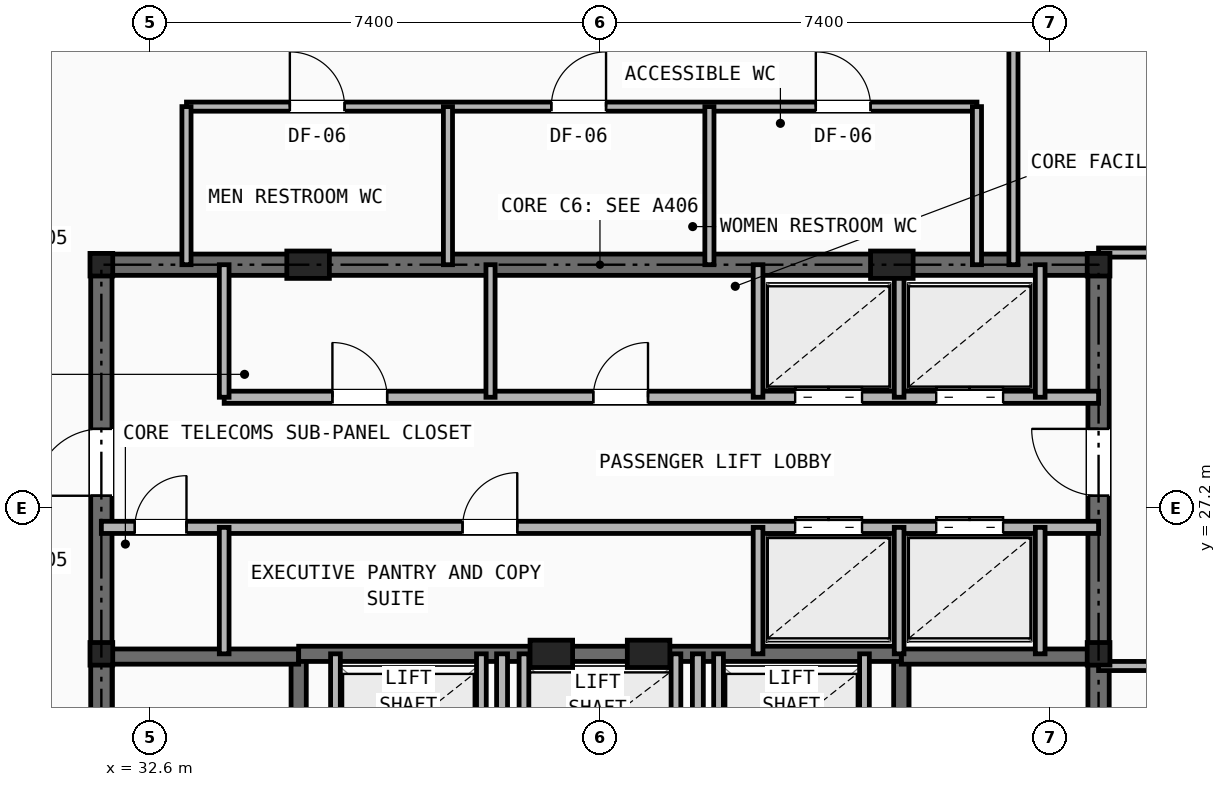
"""IFC4 building model, lengths in metres.
Left out: names, types, materials, properties, quantities, classifications, styles, units other than length and angle.
Written with IfcOpenShell. Run it as: python <this file> out.ifc"""

import sys

from ifc_helpers import new_model, si_unit, direction, frame, frame_2d, origin, origin_2d, place, context, subcontext, project, spatial, rectangle, i_section, extrude, element, fill, save


model = new_model("IFC4")
c1 = context("Model", 3, precision=1e-05, world=origin(), true_north=direction((0.0, 1.0)))
c2 = subcontext(c1, "Body", "Model", "MODEL_VIEW")
j1 = project(units=[si_unit("LENGTHUNIT", "METRE"), si_unit("PLANEANGLEUNIT", "RADIAN")], contexts=[c1])
p1 = place(None, origin())
s1 = spatial("IfcSite", under=j1, at=p1, CompositionType="ELEMENT")
p2 = place(p1, origin())
s2 = spatial("IfcBuilding", under=s1, at=p2, CompositionType="ELEMENT")
p3 = place(p2, frame((0.0, 0.0, 204.9)))
s3 = spatial("IfcBuildingStorey", under=s2, at=p3, CompositionType="ELEMENT", Elevation=204.9)
for number, where, z_axis, x_axis in (
    (1, (31.8, 24.8, 0.0), (0.0, 0.0, 1.0), (1.0, 0.0, 0.0)),
    (2, (48.2, 24.8, 0.0), (0.0, 0.0, 1.0), (1.0, 0.0, 0.0)),
    (3, (31.8, 31.2, 0.0), (0.0, 0.0, 1.0), (1.0, 0.0, 0.0)),
    (4, (48.2, 31.2, 0.0), (0.0, 0.0, 1.0), (1.0, 0.0, 0.0)),
):
    element("IfcColumn", number, at=place(p3, frame(where, z_axis=z_axis, x_axis=x_axis)), inside=s3, PredefinedType="COLUMN", context=c2, shape_type="SweptSolid", body=[
        extrude(i_section(OverallWidth=0.374, OverallDepth=0.372, WebThickness=0.016, FlangeThickness=0.026, at=origin_2d()), origin(), (0.0, 0.0, 1.0), 3.5),
    ])
for number, where, z_axis, x_axis in (
    (5, (35.2, 31.2, 0.0), (0.0, 0.0, 1.0), (1.0, 0.0, 0.0)),
    (6, (44.8, 31.2, 0.0), (0.0, 0.0, 1.0), (1.0, 0.0, 0.0)),
    (7, (39.2, 24.8, 0.0), (0.0, 0.0, 1.0), (1.0, 0.0, 0.0)),
    (8, (40.8, 24.8, 0.0), (0.0, 0.0, 1.0), (1.0, 0.0, 0.0)),
):
    element("IfcColumn", number, at=place(p3, frame(where, z_axis=z_axis, x_axis=x_axis)), inside=s3, PredefinedType="PILASTER", context=c2, shape_type="SweptSolid", body=[
        extrude(rectangle(XDim=0.7, YDim=0.45, at=origin_2d()), origin(), (0.0, 0.0, 1.0), 3.5),
    ])
p4 = place(p3, frame((31.8, 31.2, 0.0), z_axis=(0.0, 0.0, 1.0), x_axis=(1.0, 0.0, 0.0)))
e9 = element("IfcWall", 9, at=p4, inside=s3, PredefinedType="SHEAR", context=c2, shape_type="SweptSolid", body=[
    extrude(rectangle(XDim=16.4, YDim=0.35, at=frame_2d((8.2, 0.0))), origin(), (0.0, 0.0, 1.0), 3.25),
])
p5 = place(p3, frame((31.8, 16.4, 0.0), z_axis=(0.0, 0.0, 1.0), x_axis=(0.0, 1.0, 0.0)))
e10 = element("IfcWall", 10, at=p5, inside=s3, PredefinedType="SHEAR", context=c2, shape_type="SweptSolid", body=[
    extrude(rectangle(XDim=14.8, YDim=0.35, at=frame_2d((7.4, 0.0))), origin(), (0.0, 0.0, 1.0), 3.25),
])
p6 = place(p5, frame((11.0, 0.0, 0.0)))
e11 = element("IfcOpeningElement", 11, at=p6, cuts=e10, PredefinedType="OPENING", context=c2, shape_type="SweptSolid", body=[
    extrude(rectangle(XDim=1.1, YDim=2.15, at=frame_2d((0.55, 1.075))), frame((0.0, 0.185, 0.0), z_axis=(0.0, -1.0, 0.0), x_axis=(1.0, 0.0, 0.0)), (0.0, 0.0, 1.0), 0.37),
])
p7 = place(p3, frame((48.2, 16.4, 0.0), z_axis=(0.0, 0.0, 1.0), x_axis=(0.0, 1.0, 0.0)))
e12 = element("IfcWall", 12, at=p7, inside=s3, PredefinedType="SHEAR", context=c2, shape_type="SweptSolid", body=[
    extrude(rectangle(XDim=14.8, YDim=0.35, at=frame_2d((7.4, 0.0))), origin(), (0.0, 0.0, 1.0), 3.25),
])
p8 = place(p7, frame((11.0, 0.0, 0.0)))
e13 = element("IfcOpeningElement", 13, at=p8, cuts=e12, PredefinedType="OPENING", context=c2, shape_type="SweptSolid", body=[
    extrude(rectangle(XDim=1.1, YDim=2.15, at=frame_2d((0.55, 1.075))), frame((0.0, 0.185, 0.0), z_axis=(0.0, -1.0, 0.0), x_axis=(1.0, 0.0, 0.0)), (0.0, 0.0, 1.0), 0.37),
])
p9 = place(p3, frame((35.045, 16.4, 0.0), z_axis=(0.0, 0.0, 1.0), x_axis=(0.0, 1.0, 0.0)))
e14 = element("IfcWall", 14, at=p9, inside=s3, PredefinedType="SHEAR", context=c2, shape_type="SweptSolid", body=[
    extrude(rectangle(XDim=8.4, YDim=0.25, at=frame_2d((4.2, 0.0))), origin(), (0.0, 0.0, 1.0), 3.25),
])
p10 = place(p9, frame((0.45, 0.0, 0.0)))
e15 = element("IfcOpeningElement", 15, at=p10, cuts=e14, PredefinedType="OPENING", context=c2, shape_type="SweptSolid", body=[
    extrude(rectangle(XDim=0.95, YDim=2.1, at=frame_2d((0.475, 1.05))), frame((0.0, 0.135, 0.0), z_axis=(0.0, -1.0, 0.0), x_axis=(1.0, 0.0, 0.0)), (0.0, 0.0, 1.0), 0.27),
])
p11 = place(p3, frame((31.8, 24.755, 0.0), z_axis=(0.0, 0.0, 1.0), x_axis=(1.0, 0.0, 0.0)))
e16 = element("IfcWall", 16, at=p11, inside=s3, PredefinedType="SHEAR", context=c2, shape_type="SweptSolid", body=[
    extrude(rectangle(XDim=3.245, YDim=0.25, at=frame_2d((1.623, 0.0))), origin(), (0.0, 0.0, 1.0), 3.25),
])
p12 = place(p3, frame((44.955, 16.4, 0.0), z_axis=(0.0, 0.0, 1.0), x_axis=(0.0, 1.0, 0.0)))
e17 = element("IfcWall", 17, at=p12, inside=s3, PredefinedType="SHEAR", context=c2, shape_type="SweptSolid", body=[
    extrude(rectangle(XDim=8.4, YDim=0.25, at=frame_2d((4.2, 0.0))), origin(), (0.0, 0.0, 1.0), 3.25),
])
p13 = place(p12, frame((0.45, 0.0, 0.0)))
e18 = element("IfcOpeningElement", 18, at=p13, cuts=e17, PredefinedType="OPENING", context=c2, shape_type="SweptSolid", body=[
    extrude(rectangle(XDim=0.95, YDim=2.1, at=frame_2d((0.475, 1.05))), frame((0.0, 0.135, 0.0), z_axis=(0.0, -1.0, 0.0), x_axis=(1.0, 0.0, 0.0)), (0.0, 0.0, 1.0), 0.27),
])
p14 = place(p3, frame((44.955, 24.755, 0.0), z_axis=(0.0, 0.0, 1.0), x_axis=(1.0, 0.0, 0.0)))
e19 = element("IfcWall", 19, at=p14, inside=s3, PredefinedType="SHEAR", context=c2, shape_type="SweptSolid", body=[
    extrude(rectangle(XDim=3.245, YDim=0.25, at=frame_2d((1.623, 0.0))), origin(), (0.0, 0.0, 1.0), 3.25),
])
p15 = place(p3, frame((35.045, 24.8, 0.0), z_axis=(0.0, 0.0, 1.0), x_axis=(1.0, 0.0, 0.0)))
e20 = element("IfcWall", 20, at=p15, inside=s3, PredefinedType="SHEAR", context=c2, shape_type="SweptSolid", body=[
    extrude(rectangle(XDim=9.91, YDim=0.25, at=frame_2d((4.955, 0.0))), origin(), (0.0, 0.0, 1.0), 3.25),
])
p16 = place(p3, frame((38.39, 16.4, 0.0), z_axis=(0.0, 0.0, 1.0), x_axis=(0.0, 1.0, 0.0)))
e21 = element("IfcWall", 21, at=p16, inside=s3, PredefinedType="PARTITIONING", context=c2, shape_type="SweptSolid", body=[
    extrude(rectangle(XDim=8.4, YDim=0.18, at=frame_2d((4.2, 0.0))), origin(), (0.0, 0.0, 1.0), 2.705),
])
p17 = place(p16, frame((3.85, 0.0, 0.0)))
e22 = element("IfcOpeningElement", 22, at=p17, cuts=e21, PredefinedType="OPENING", context=c2, shape_type="SweptSolid", body=[
    extrude(rectangle(XDim=0.95, YDim=2.1, at=frame_2d((0.475, 1.05))), frame((0.0, 0.1, 0.0), z_axis=(0.0, -1.0, 0.0), x_axis=(1.0, 0.0, 0.0)), (0.0, 0.0, 1.0), 0.2),
])
p18 = place(p3, frame((41.61, 16.4, 0.0), z_axis=(0.0, 0.0, 1.0), x_axis=(0.0, 1.0, 0.0)))
e23 = element("IfcWall", 23, at=p18, inside=s3, PredefinedType="PARTITIONING", context=c2, shape_type="SweptSolid", body=[
    extrude(rectangle(XDim=8.4, YDim=0.18, at=frame_2d((4.2, 0.0))), origin(), (0.0, 0.0, 1.0), 2.705),
])
for number, where, z_axis, x_axis in (
    (24, (35.65, 22.48, 0.0), (0.0, 0.0, 1.0), (0.0, 1.0, 0.0)),
    (25, (38.05, 22.48, 0.0), (0.0, 0.0, 1.0), (0.0, 1.0, 0.0)),
    (26, (41.95, 22.48, 0.0), (0.0, 0.0, 1.0), (0.0, 1.0, 0.0)),
    (27, (44.35, 22.48, 0.0), (0.0, 0.0, 1.0), (0.0, 1.0, 0.0)),
    (28, (38.75, 22.48, 0.0), (0.0, 0.0, 1.0), (0.0, 1.0, 0.0)),
    (29, (41.25, 22.48, 0.0), (0.0, 0.0, 1.0), (0.0, 1.0, 0.0)),
):
    element("IfcWall", number, at=place(p3, frame(where, z_axis=z_axis, x_axis=x_axis)), inside=s3, PredefinedType="SOLIDWALL", context=c2, shape_type="SweptSolid", body=[
        extrude(rectangle(XDim=2.32, YDim=0.16, at=frame_2d((1.16, 0.0))), origin(), (0.0, 0.0, 1.0), 3.25),
    ])
p19 = place(p3, frame((33.82, 29.02, 0.0), z_axis=(0.0, 0.0, 1.0), x_axis=(1.0, 0.0, 0.0)))
e30 = element("IfcWall", 30, at=p19, inside=s3, PredefinedType="SOLIDWALL", context=c2, shape_type="SweptSolid", body=[
    extrude(rectangle(XDim=14.38, YDim=0.2, at=frame_2d((7.19, 0.0))), origin(), (0.0, 0.0, 1.0), 2.705),
])
p20 = place(p19, frame((1.78, 0.0, 0.0)))
e31 = element("IfcOpeningElement", 31, at=p20, cuts=e30, PredefinedType="OPENING", context=c2, shape_type="SweptSolid", body=[
    extrude(rectangle(XDim=0.9, YDim=2.1, at=frame_2d((0.45, 1.05))), frame((0.0, 0.11, 0.0), z_axis=(0.0, -1.0, 0.0), x_axis=(1.0, 0.0, 0.0)), (0.0, 0.0, 1.0), 0.22),
])
p21 = place(p19, frame((6.07, 0.0, 0.0)))
e32 = element("IfcOpeningElement", 32, at=p21, cuts=e30, PredefinedType="OPENING", context=c2, shape_type="SweptSolid", body=[
    extrude(rectangle(XDim=0.9, YDim=2.1, at=frame_2d((0.45, 1.05))), frame((0.0, 0.11, 0.0), z_axis=(0.0, -1.0, 0.0), x_axis=(1.0, 0.0, 0.0)), (0.0, 0.0, 1.0), 0.22),
])
p22 = place(p19, frame((9.39, 0.0, 0.0)))
e33 = element("IfcOpeningElement", 33, at=p22, cuts=e30, PredefinedType="OPENING", context=c2, shape_type="SweptSolid", body=[
    extrude(rectangle(XDim=1.1, YDim=2.15, at=frame_2d((0.55, 1.075))), frame((0.0, 0.11, 0.0), z_axis=(0.0, -1.0, 0.0), x_axis=(1.0, 0.0, 0.0)), (0.0, 0.0, 1.0), 0.22),
])
p23 = place(p19, frame((11.71, 0.0, 0.0)))
e34 = element("IfcOpeningElement", 34, at=p23, cuts=e30, PredefinedType="OPENING", context=c2, shape_type="SweptSolid", body=[
    extrude(rectangle(XDim=1.1, YDim=2.15, at=frame_2d((0.55, 1.075))), frame((0.0, 0.11, 0.0), z_axis=(0.0, -1.0, 0.0), x_axis=(1.0, 0.0, 0.0)), (0.0, 0.0, 1.0), 0.22),
])
p24 = place(p3, frame((31.8, 26.88, 0.0), z_axis=(0.0, 0.0, 1.0), x_axis=(1.0, 0.0, 0.0)))
e35 = element("IfcWall", 35, at=p24, inside=s3, PredefinedType="SOLIDWALL", context=c2, shape_type="SweptSolid", body=[
    extrude(rectangle(XDim=16.4, YDim=0.2, at=frame_2d((8.2, 0.0))), origin(), (0.0, 0.0, 1.0), 2.705),
])
p25 = place(p24, frame((0.55, 0.0, 0.0)))
e36 = element("IfcOpeningElement", 36, at=p25, cuts=e35, PredefinedType="OPENING", context=c2, shape_type="SweptSolid", body=[
    extrude(rectangle(XDim=0.85, YDim=2.05, at=frame_2d((0.425, 1.025))), frame((0.0, 0.11, 0.0), z_axis=(0.0, -1.0, 0.0), x_axis=(1.0, 0.0, 0.0)), (0.0, 0.0, 1.0), 0.22),
])
p26 = place(p24, frame((5.94, 0.0, 0.0)))
e37 = element("IfcOpeningElement", 37, at=p26, cuts=e35, PredefinedType="OPENING", context=c2, shape_type="SweptSolid", body=[
    extrude(rectangle(XDim=0.9, YDim=2.1, at=frame_2d((0.45, 1.05))), frame((0.0, 0.11, 0.0), z_axis=(0.0, -1.0, 0.0), x_axis=(1.0, 0.0, 0.0)), (0.0, 0.0, 1.0), 0.22),
])
p27 = place(p24, frame((11.41, 0.0, 0.0)))
e38 = element("IfcOpeningElement", 38, at=p27, cuts=e35, PredefinedType="OPENING", context=c2, shape_type="SweptSolid", body=[
    extrude(rectangle(XDim=1.1, YDim=2.15, at=frame_2d((0.55, 1.075))), frame((0.0, 0.11, 0.0), z_axis=(0.0, -1.0, 0.0), x_axis=(1.0, 0.0, 0.0)), (0.0, 0.0, 1.0), 0.22),
])
p28 = place(p24, frame((13.73, 0.0, 0.0)))
e39 = element("IfcOpeningElement", 39, at=p28, cuts=e35, PredefinedType="OPENING", context=c2, shape_type="SweptSolid", body=[
    extrude(rectangle(XDim=1.1, YDim=2.15, at=frame_2d((0.55, 1.075))), frame((0.0, 0.11, 0.0), z_axis=(0.0, -1.0, 0.0), x_axis=(1.0, 0.0, 0.0)), (0.0, 0.0, 1.0), 0.22),
])
p29 = place(p3, frame((33.82, 29.02, 0.0), z_axis=(0.0, 0.0, 1.0), x_axis=(0.0, 1.0, 0.0)))
e40 = element("IfcWall", 40, at=p29, inside=s3, PredefinedType="SOLIDWALL", context=c2, shape_type="SweptSolid", body=[
    extrude(rectangle(XDim=2.18, YDim=0.16, at=frame_2d((1.09, 0.0))), origin(), (0.0, 0.0, 1.0), 2.705),
])
p30 = place(p3, frame((33.82, 24.8, 0.0), z_axis=(0.0, 0.0, 1.0), x_axis=(0.0, 1.0, 0.0)))
e41 = element("IfcWall", 41, at=p30, inside=s3, PredefinedType="SOLIDWALL", context=c2, shape_type="SweptSolid", body=[
    extrude(rectangle(XDim=2.08, YDim=0.16, at=frame_2d((1.04, 0.0))), origin(), (0.0, 0.0, 1.0), 3.25),
])
p31 = place(p3, frame((38.2, 29.02, 0.0), z_axis=(0.0, 0.0, 1.0), x_axis=(0.0, 1.0, 0.0)))
e42 = element("IfcWall", 42, at=p31, inside=s3, PredefinedType="PARTITIONING", context=c2, shape_type="SweptSolid", body=[
    extrude(rectangle(XDim=2.18, YDim=0.15, at=frame_2d((1.09, 0.0))), origin(), (0.0, 0.0, 1.0), 2.705),
])
for number, where, z_axis, x_axis in (
    (43, (42.6, 29.02, 0.0), (0.0, 0.0, 1.0), (0.0, 1.0, 0.0)),
    (44, (44.92, 29.02, 0.0), (0.0, 0.0, 1.0), (0.0, 1.0, 0.0)),
    (45, (47.24, 29.02, 0.0), (0.0, 0.0, 1.0), (0.0, 1.0, 0.0)),
):
    element("IfcWall", number, at=place(p3, frame(where, z_axis=z_axis, x_axis=x_axis)), inside=s3, PredefinedType="SOLIDWALL", context=c2, shape_type="SweptSolid", body=[
        extrude(rectangle(XDim=2.18, YDim=0.16, at=frame_2d((1.09, 0.0))), origin(), (0.0, 0.0, 1.0), 2.705),
    ])
for number, where, z_axis, x_axis in (
    (46, (42.6, 24.8, 0.0), (0.0, 0.0, 1.0), (0.0, 1.0, 0.0)),
    (47, (44.92, 24.8, 0.0), (0.0, 0.0, 1.0), (0.0, 1.0, 0.0)),
    (48, (47.24, 24.8, 0.0), (0.0, 0.0, 1.0), (0.0, 1.0, 0.0)),
):
    element("IfcWall", number, at=place(p3, frame(where, z_axis=z_axis, x_axis=x_axis)), inside=s3, PredefinedType="SOLIDWALL", context=c2, shape_type="SweptSolid", body=[
        extrude(rectangle(XDim=2.08, YDim=0.16, at=frame_2d((1.04, 0.0))), origin(), (0.0, 0.0, 1.0), 3.25),
    ])
p32 = place(p3, frame((33.2, 33.8, 0.0), z_axis=(0.0, 0.0, 1.0), x_axis=(1.0, 0.0, 0.0)))
e49 = element("IfcWall", 49, at=p32, inside=s3, PredefinedType="PARTITIONING", context=c2, shape_type="SweptSolid", body=[
    extrude(rectangle(XDim=13.0, YDim=0.15, at=frame_2d((6.5, 0.0))), origin(), (0.0, 0.0, 1.0), 3.25),
])
p33 = place(p32, frame((1.7, 0.0, 0.0)))
e50 = element("IfcOpeningElement", 50, at=p33, cuts=e49, PredefinedType="OPENING", context=c2, shape_type="SweptSolid", body=[
    extrude(rectangle(XDim=0.9, YDim=2.1, at=frame_2d((0.45, 1.05))), frame((0.0, 0.085, 0.0), z_axis=(0.0, -1.0, 0.0), x_axis=(1.0, 0.0, 0.0)), (0.0, 0.0, 1.0), 0.17),
])
p34 = place(p32, frame((6.0, 0.0, 0.0)))
e51 = element("IfcOpeningElement", 51, at=p34, cuts=e49, PredefinedType="OPENING", context=c2, shape_type="SweptSolid", body=[
    extrude(rectangle(XDim=0.9, YDim=2.1, at=frame_2d((0.45, 1.05))), frame((0.0, 0.085, 0.0), z_axis=(0.0, -1.0, 0.0), x_axis=(1.0, 0.0, 0.0)), (0.0, 0.0, 1.0), 0.17),
])
p35 = place(p32, frame((10.35, 0.0, 0.0)))
e52 = element("IfcOpeningElement", 52, at=p35, cuts=e49, PredefinedType="OPENING", context=c2, shape_type="SweptSolid", body=[
    extrude(rectangle(XDim=0.9, YDim=2.1, at=frame_2d((0.45, 1.05))), frame((0.0, 0.085, 0.0), z_axis=(0.0, -1.0, 0.0), x_axis=(1.0, 0.0, 0.0)), (0.0, 0.0, 1.0), 0.17),
])
for number, where, z_axis, x_axis in (
    (53, (33.2, 31.2, 0.0), (0.0, 0.0, 1.0), (0.0, 1.0, 0.0)),
    (54, (46.2, 31.2, 0.0), (0.0, 0.0, 1.0), (0.0, 1.0, 0.0)),
    (55, (37.5, 31.2, 0.0), (0.0, 0.0, 1.0), (0.0, 1.0, 0.0)),
    (56, (41.8, 31.2, 0.0), (0.0, 0.0, 1.0), (0.0, 1.0, 0.0)),
):
    element("IfcWall", number, at=place(p3, frame(where, z_axis=z_axis, x_axis=x_axis)), inside=s3, PredefinedType="PARTITIONING", context=c2, shape_type="SweptSolid", body=[
        extrude(rectangle(XDim=2.6, YDim=0.15, at=frame_2d((1.3, 0.0))), origin(), (0.0, 0.0, 1.0), 2.705),
    ])
p36 = place(p3, frame((46.8, 31.2, 0.0), z_axis=(0.0, 0.0, 1.0), x_axis=(0.0, 1.0, 0.0)))
e57 = element("IfcWall", 57, at=p36, inside=s3, PredefinedType="PARTITIONING", context=c2, shape_type="SweptSolid", body=[
    extrude(rectangle(XDim=4.5, YDim=0.15, at=frame_2d((2.25, 0.0))), origin(), (0.0, 0.0, 1.0), 2.705),
])
p37 = place(p3, frame((48.2, 24.6, 0.0), z_axis=(0.0, 0.0, 1.0), x_axis=(1.0, 0.0, 0.0)))
e58 = element("IfcWall", 58, at=p37, inside=s3, PredefinedType="PARTITIONING", context=c2, shape_type="SweptSolid", body=[
    extrude(rectangle(XDim=10.492, YDim=0.15, at=frame_2d((5.246, 0.0))), origin(), (0.0, 0.0, 1.0), 2.628),
])
p38 = place(p37, frame((1.4, 0.0, 0.0)))
e59 = element("IfcOpeningElement", 59, at=p38, cuts=e58, PredefinedType="OPENING", context=c2, shape_type="SweptSolid", body=[
    extrude(rectangle(XDim=0.95, YDim=2.1, at=frame_2d((0.475, 1.05))), frame((0.0, 0.085, 0.0), z_axis=(0.0, -1.0, 0.0), x_axis=(1.0, 0.0, 0.0)), (0.0, 0.0, 1.0), 0.17),
])
p39 = place(p3, frame((48.2, 31.4, 0.0), z_axis=(0.0, 0.0, 1.0), x_axis=(1.0, 0.0, 0.0)))
e60 = element("IfcWall", 60, at=p39, inside=s3, PredefinedType="PARTITIONING", context=c2, shape_type="SweptSolid", body=[
    extrude(rectangle(XDim=5.896, YDim=0.15, at=frame_2d((2.948, 0.0))), origin(), (0.0, 0.0, 1.0), 2.292),
])
p40 = place(p39, frame((1.4, 0.0, 0.0)))
e61 = element("IfcOpeningElement", 61, at=p40, cuts=e60, PredefinedType="OPENING", context=c2, shape_type="SweptSolid", body=[
    extrude(rectangle(XDim=0.95, YDim=2.1, at=frame_2d((0.475, 1.05))), frame((0.0, 0.085, 0.0), z_axis=(0.0, -1.0, 0.0), x_axis=(1.0, 0.0, 0.0)), (0.0, 0.0, 1.0), 0.17),
])
p41 = place(p25, origin())
e62 = element("IfcDoor", 62, at=p41, inside=s3, OperationType="SINGLE_SWING_RIGHT", PredefinedType="DOOR", context=c2, shape_type="SweptSolid", body=[
    extrude(rectangle(XDim=0.85, YDim=2.05, at=frame_2d((0.425, 1.025))), frame((0.0, 0.025, 0.0), z_axis=(0.0, -1.0, 0.0), x_axis=(1.0, 0.0, 0.0)), (0.0, 0.0, 1.0), 0.05),
])
fill(e36, e62)
p42 = place(p6, origin())
e63 = element("IfcDoor", 63, at=p42, inside=s3, OperationType="SINGLE_SWING_LEFT", PredefinedType="DOOR", context=c2, shape_type="SweptSolid", body=[
    extrude(rectangle(XDim=1.1, YDim=2.15, at=frame_2d((0.55, 1.075))), frame((0.0, 0.025, 0.0), z_axis=(0.0, -1.0, 0.0), x_axis=(1.0, 0.0, 0.0)), (0.0, 0.0, 1.0), 0.05),
])
fill(e11, e63)
p43 = place(p8, origin())
e64 = element("IfcDoor", 64, at=p43, inside=s3, OperationType="SINGLE_SWING_RIGHT", PredefinedType="DOOR", context=c2, shape_type="SweptSolid", body=[
    extrude(rectangle(XDim=1.1, YDim=2.15, at=frame_2d((0.55, 1.075))), frame((0.0, 0.025, 0.0), z_axis=(0.0, -1.0, 0.0), x_axis=(1.0, 0.0, 0.0)), (0.0, 0.0, 1.0), 0.05),
])
fill(e13, e64)
p44 = place(p20, origin())
e65 = element("IfcDoor", 65, at=p44, inside=s3, OperationType="SINGLE_SWING_LEFT", PredefinedType="DOOR", context=c2, shape_type="SweptSolid", body=[
    extrude(rectangle(XDim=0.9, YDim=2.1, at=frame_2d((0.45, 1.05))), frame((0.0, 0.025, 0.0), z_axis=(0.0, -1.0, 0.0), x_axis=(1.0, 0.0, 0.0)), (0.0, 0.0, 1.0), 0.05),
])
fill(e31, e65)
p45 = place(p21, origin())
e66 = element("IfcDoor", 66, at=p45, inside=s3, OperationType="SINGLE_SWING_RIGHT", PredefinedType="DOOR", context=c2, shape_type="SweptSolid", body=[
    extrude(rectangle(XDim=0.9, YDim=2.1, at=frame_2d((0.45, 1.05))), frame((0.0, 0.025, 0.0), z_axis=(0.0, -1.0, 0.0), x_axis=(1.0, 0.0, 0.0)), (0.0, 0.0, 1.0), 0.05),
])
fill(e32, e66)
p46 = place(p26, origin())
e67 = element("IfcDoor", 67, at=p46, inside=s3, OperationType="SINGLE_SWING_RIGHT", PredefinedType="DOOR", context=c2, shape_type="SweptSolid", body=[
    extrude(rectangle(XDim=0.9, YDim=2.1, at=frame_2d((0.45, 1.05))), frame((0.0, 0.025, 0.0), z_axis=(0.0, -1.0, 0.0), x_axis=(1.0, 0.0, 0.0)), (0.0, 0.0, 1.0), 0.05),
])
fill(e37, e67)
p47 = place(p22, origin())
e68 = element("IfcDoor", 68, at=p47, inside=s3, OperationType="DOUBLE_DOOR_SLIDING", PredefinedType="DOOR", context=c2, shape_type="SweptSolid", body=[
    extrude(rectangle(XDim=1.1, YDim=2.15, at=frame_2d((0.55, 1.075))), frame((0.0, 0.025, 0.0), z_axis=(0.0, -1.0, 0.0), x_axis=(1.0, 0.0, 0.0)), (0.0, 0.0, 1.0), 0.05),
])
fill(e33, e68)
p48 = place(p23, origin())
e69 = element("IfcDoor", 69, at=p48, inside=s3, OperationType="DOUBLE_DOOR_SLIDING", PredefinedType="DOOR", context=c2, shape_type="SweptSolid", body=[
    extrude(rectangle(XDim=1.1, YDim=2.15, at=frame_2d((0.55, 1.075))), frame((0.0, 0.025, 0.0), z_axis=(0.0, -1.0, 0.0), x_axis=(1.0, 0.0, 0.0)), (0.0, 0.0, 1.0), 0.05),
])
fill(e34, e69)
p49 = place(p27, origin())
e70 = element("IfcDoor", 70, at=p49, inside=s3, OperationType="DOUBLE_DOOR_SLIDING", PredefinedType="DOOR", context=c2, shape_type="SweptSolid", body=[
    extrude(rectangle(XDim=1.1, YDim=2.15, at=frame_2d((0.55, 1.075))), frame((0.0, 0.025, 0.0), z_axis=(0.0, -1.0, 0.0), x_axis=(1.0, 0.0, 0.0)), (0.0, 0.0, 1.0), 0.05),
])
fill(e38, e70)
p50 = place(p28, origin())
e71 = element("IfcDoor", 71, at=p50, inside=s3, OperationType="DOUBLE_DOOR_SLIDING", PredefinedType="DOOR", context=c2, shape_type="SweptSolid", body=[
    extrude(rectangle(XDim=1.1, YDim=2.15, at=frame_2d((0.55, 1.075))), frame((0.0, 0.025, 0.0), z_axis=(0.0, -1.0, 0.0), x_axis=(1.0, 0.0, 0.0)), (0.0, 0.0, 1.0), 0.05),
])
fill(e39, e71)
p51 = place(p33, origin())
e72 = element("IfcDoor", 72, at=p51, inside=s3, OperationType="SINGLE_SWING_LEFT", PredefinedType="DOOR", context=c2, shape_type="SweptSolid", body=[
    extrude(rectangle(XDim=0.9, YDim=2.1, at=frame_2d((0.45, 1.05))), frame((0.0, 0.025, 0.0), z_axis=(0.0, -1.0, 0.0), x_axis=(1.0, 0.0, 0.0)), (0.0, 0.0, 1.0), 0.05),
])
fill(e50, e72)
p52 = place(p34, origin())
e73 = element("IfcDoor", 73, at=p52, inside=s3, OperationType="SINGLE_SWING_RIGHT", PredefinedType="DOOR", context=c2, shape_type="SweptSolid", body=[
    extrude(rectangle(XDim=0.9, YDim=2.1, at=frame_2d((0.45, 1.05))), frame((0.0, 0.025, 0.0), z_axis=(0.0, -1.0, 0.0), x_axis=(1.0, 0.0, 0.0)), (0.0, 0.0, 1.0), 0.05),
])
fill(e51, e73)
p53 = place(p35, origin())
e74 = element("IfcDoor", 74, at=p53, inside=s3, OperationType="SINGLE_SWING_LEFT", PredefinedType="DOOR", context=c2, shape_type="SweptSolid", body=[
    extrude(rectangle(XDim=0.9, YDim=2.1, at=frame_2d((0.45, 1.05))), frame((0.0, 0.025, 0.0), z_axis=(0.0, -1.0, 0.0), x_axis=(1.0, 0.0, 0.0)), (0.0, 0.0, 1.0), 0.05),
])
fill(e52, e74)
save(model, sys.argv[1])
